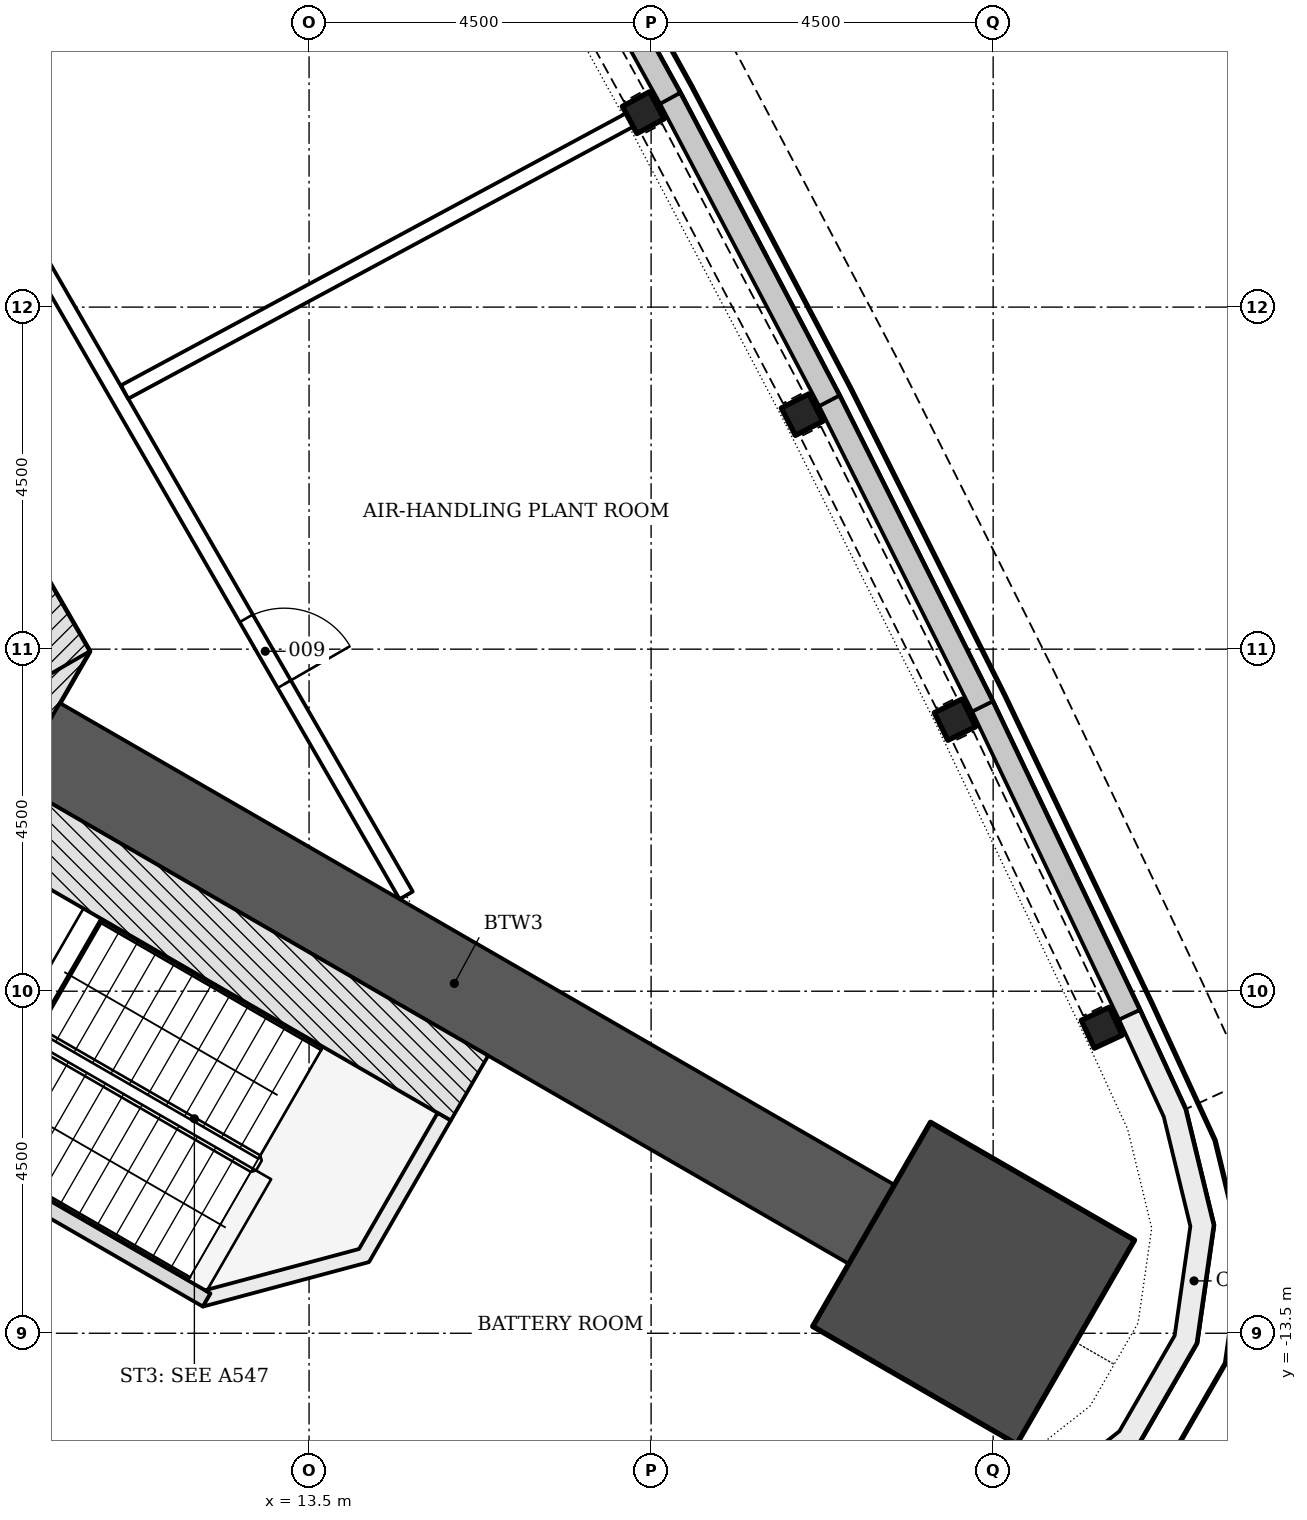
"""IFC4 building model, lengths in metres.
Left out: names, types, materials, properties, quantities, classifications, styles, units other than length and angle.
Written with IfcOpenShell. Run it as: python <this file> out.ifc"""

import sys

from ifc_helpers import new_model, si_unit, direction, frame, frame_2d, origin, origin_2d, place, context, subcontext, project, spatial, polyline, rectangle, i_section, outline, extrude, element, fill, save


model = new_model("IFC4")
c1 = context("Model", 3, precision=1e-05, world=origin(), true_north=direction((0.0, 1.0)))
c2 = subcontext(c1, "Body", "Model", "MODEL_VIEW")
j1 = project(units=[si_unit("LENGTHUNIT", "METRE"), si_unit("PLANEANGLEUNIT", "RADIAN")], contexts=[c1])
p1 = place(None, origin())
s1 = spatial("IfcSite", under=j1, at=p1, CompositionType="ELEMENT")
p2 = place(p1, origin())
s2 = spatial("IfcBuilding", under=s1, at=p2, CompositionType="ELEMENT")
p3 = place(p2, frame((0.0, 0.0, 87.0)))
s3 = spatial("IfcBuildingStorey", under=s2, at=p3, CompositionType="ELEMENT", Elevation=87.0)
p4 = place(p3, frame((8.926, -6.753, -0.3), z_axis=(0.0, 0.0, 1.0), x_axis=(0.500042739161, 0.866000726912, 0.0)))
e1 = element("IfcWall", 1, at=p4, inside=s3, PredefinedType="SHEAR", context=c2, shape_type="SweptSolid", body=[
    extrude(rectangle(XDim=2.771, YDim=0.7, at=frame_2d((1.386, 0.0))), origin(), (0.0, 0.0, 1.0), 4.6),
])
p5 = place(p3, frame((10.311, -4.703, -0.3), z_axis=(0.0, 0.0, 1.0), x_axis=(-0.500001446645, 0.866024568562, 0.0)))
e2 = element("IfcWall", 2, at=p5, inside=s3, PredefinedType="SHEAR", context=c2, shape_type="SweptSolid", body=[
    extrude(rectangle(XDim=18.458, YDim=0.7, at=frame_2d((9.229, 0.0))), origin(), (0.0, 0.0, 1.0), 4.6),
])
p6 = place(p5, frame((8.7, 0.0, 0.3)))
e3 = element("IfcOpeningElement", 3, at=p6, cuts=e2, PredefinedType="OPENING", context=c2, shape_type="SweptSolid", body=[
    extrude(rectangle(XDim=1.0, YDim=2.1, at=frame_2d((0.5, 1.05))), frame((0.0, 0.36, 0.0), z_axis=(0.0, -1.0, 0.0), x_axis=(1.0, 0.0, 0.0)), (0.0, 0.0, 1.0), 0.72),
])
p7 = place(p5, frame((4.002, 0.0, 0.3)))
e4 = element("IfcOpeningElement", 4, at=p7, cuts=e2, PredefinedType="OPENING", context=c2, shape_type="SweptSolid", body=[
    extrude(rectangle(XDim=0.9, YDim=2.1, at=frame_2d((0.45, 1.05))), frame((0.0, 0.36, 0.0), z_axis=(0.0, -1.0, 0.0), x_axis=(1.0, 0.0, 0.0)), (0.0, 0.0, 1.0), 0.72),
])
p8 = place(p5, frame((14.093, 0.0, 0.3)))
e5 = element("IfcOpeningElement", 5, at=p8, cuts=e2, PredefinedType="OPENING", context=c2, shape_type="SweptSolid", body=[
    extrude(rectangle(XDim=0.9, YDim=2.1, at=frame_2d((0.45, 1.05))), frame((0.0, 0.36, 0.0), z_axis=(0.0, -1.0, 0.0), x_axis=(1.0, 0.0, 0.0)), (0.0, 0.0, 1.0), 0.72),
])
p9 = place(p3, frame((9.922, -5.728, -0.3), z_axis=(0.0, 0.0, 1.0), x_axis=(0.866029086277, -0.499993621681, 0.0)))
e6 = element("IfcWall", 6, at=p9, inside=s3, PredefinedType="SHEAR", context=c2, shape_type="SweptSolid", body=[
    extrude(rectangle(XDim=12.677, YDim=1.2, at=frame_2d((6.339, 0.0))), origin(), (0.0, 0.0, 1.0), 4.6),
])
p10 = place(p3, frame((22.243, -12.842, -0.3), z_axis=(0.0, 0.0, 1.0), x_axis=(0.866025403784, -0.5, 0.0)))
e7 = element("IfcColumn", 7, at=p10, inside=s3, PredefinedType="COLUMN", context=c2, shape_type="SweptSolid", body=[
    extrude(rectangle(XDim=3.1, YDim=3.1, at=origin_2d()), origin(), (0.0, 0.0, 1.0), 4.6),
])
for number, where, z_axis, x_axis in (
    (8, (23.929, -9.48, -0.3), (0.0, 0.0, 1.0), (-0.421, 0.907, 0.0)),
    (9, (21.998, -5.428, -0.3), (0.0, 0.0, 1.0), (-0.439, 0.898, 0.0)),
    (10, (19.986, -1.415, -0.3), (0.0, 0.0, 1.0), (-0.457, 0.89, 0.0)),
    (11, (17.897, 2.558, -0.3), (0.0, 0.0, 1.0), (-0.474, 0.88, 0.0)),
):
    element("IfcColumn", number, at=place(p3, frame(where, z_axis=z_axis, x_axis=x_axis)), inside=s3, PredefinedType="COLUMN", context=c2, shape_type="SweptSolid", body=[
        extrude(i_section(OverallWidth=0.404, OverallDepth=0.406, WebThickness=0.027, FlangeThickness=0.044, FilletRadius=0.015, at=origin_2d()), origin(), (0.0, 0.0, 1.0), 4.6),
    ])
p11 = place(p3, origin())
e12 = element("IfcWall", 12, at=p11, inside=s3, PredefinedType="NOTDEFINED", context=c2, shape_type="SweptSolid", body=[
    extrude(outline(polyline([(24.428, -9.249), (22.492, -5.187), (22.221, -5.316), (24.157, -9.378), (24.428, -9.249)])), origin(), (0.0, 0.0, 1.0), 1.2),
])
p12 = place(p3, origin())
e13 = element("IfcWall", 13, at=p12, inside=s3, PredefinedType="NOTDEFINED", context=c2, shape_type="SweptSolid", body=[
    extrude(outline(polyline([(22.492, -5.187), (20.476, -1.164), (20.208, -1.298), (22.224, -5.321), (22.492, -5.187)])), origin(), (0.0, 0.0, 1.0), 1.2),
])
p13 = place(p3, origin())
e14 = element("IfcWall", 14, at=p13, inside=s3, PredefinedType="NOTDEFINED", context=c2, shape_type="SweptSolid", body=[
    extrude(outline(polyline([(20.476, -1.164), (18.381, 2.819), (18.115, 2.679), (20.21, -1.303), (20.476, -1.164)])), origin(), (0.0, 0.0, 1.0), 1.2),
])
p14 = place(p3, origin())
e15 = element("IfcWall", 15, at=p14, inside=s3, PredefinedType="NOTDEFINED", context=c2, shape_type="SweptSolid", body=[
    extrude(outline(polyline([(18.381, 2.819), (16.208, 6.76), (15.945, 6.615), (18.118, 2.674), (18.381, 2.819)])), origin(), (0.0, 0.0, 1.0), 1.2),
])
p15 = place(p3, origin())
e16 = element("IfcWall", 16, at=p15, inside=s3, PredefinedType="NOTDEFINED", context=c2, shape_type="SweptSolid", body=[
    extrude(outline(polyline([(20.224, -16.531), (21.654, -16.4), (23.159, -15.958), (24.392, -14.989), (25.177, -13.63), (25.4, -12.077), (25.03, -10.553), (24.428, -9.249), (24.156, -9.374), (24.745, -10.652), (25.094, -12.092), (24.888, -13.53), (24.161, -14.789), (23.019, -15.687), (21.597, -16.104), (20.196, -16.232), (20.224, -16.531)])), origin(), (0.0, 0.0, 1.0), 4.3),
])
p16 = place(p3, frame((7.304, -10.262, -0.3), z_axis=(0.0, 0.0, 1.0), x_axis=(0.866026594901, -0.49999793692, 0.0)))
e17 = element("IfcWall", 17, at=p16, inside=s3, PredefinedType="SHEAR", context=c2, shape_type="SweptSolid", body=[
    extrude(rectangle(XDim=5.6, YDim=0.2, at=frame_2d((2.8, 0.0))), origin(), (0.0, 0.0, 1.0), 4.6),
])
p17 = place(p16, frame((0.45, 0.0, 0.3)))
e18 = element("IfcOpeningElement", 18, at=p17, cuts=e17, PredefinedType="OPENING", context=c2, shape_type="SweptSolid", body=[
    extrude(rectangle(XDim=1.2, YDim=2.1, at=frame_2d((0.6, 1.05))), frame((0.0, 0.11, 0.0), z_axis=(0.0, -1.0, 0.0), x_axis=(1.0, 0.0, 0.0)), (0.0, 0.0, 1.0), 0.22),
])
p18 = place(p3, frame((9.375, -6.675, -0.3), z_axis=(0.0, 0.0, 1.0), x_axis=(0.866026919366, -0.499997374926, 0.0)))
e19 = element("IfcWall", 19, at=p18, inside=s3, PredefinedType="SHEAR", context=c2, shape_type="SweptSolid", body=[
    extrude(rectangle(XDim=7.2, YDim=0.986, at=frame_2d((3.6, 0.0))), origin(), (0.0, 0.0, 1.0), 4.6),
])
p19 = place(p3, frame((0.0, 0.0, -0.3)))
e20 = element("IfcWall", 20, at=p19, inside=s3, PredefinedType="SHEAR", context=c2, shape_type="SweptSolid", body=[
    extrude(outline(polyline([(12.104, -13.149), (14.289, -12.563), (15.364, -10.701), (15.191, -10.601), (14.157, -12.392), (12.132, -12.934), (12.204, -12.976), (12.204, -12.976), (12.204, -12.976), (12.204, -12.976), (12.204, -12.976), (12.204, -12.976), (12.204, -12.976), (12.204, -12.976), (12.204, -12.976), (12.204, -12.976), (12.204, -12.976), (12.204, -12.976), (12.204, -12.976), (12.204, -12.976), (12.204, -12.976), (12.204, -12.976), (12.204, -12.976), (12.104, -13.149)])), origin(), (0.0, 0.0, 1.0), 4.6),
])
p20 = place(p3, frame((5.282, 8.708, 0.0), z_axis=(0.0, 0.0, 1.0), x_axis=(0.500007704848, -0.866020955343, 0.0)))
e21 = element("IfcWall", 21, at=p20, inside=s3, PredefinedType="PARTITIONING", context=c2, shape_type="SweptSolid", body=[
    extrude(rectangle(XDim=18.991, YDim=0.2, at=frame_2d((9.496, 0.0))), origin(), (0.0, 0.0, 1.0), 3.678),
])
p21 = place(p20, frame((14.783, 0.0, 0.0)))
e22 = element("IfcOpeningElement", 22, at=p21, cuts=e21, PredefinedType="OPENING", context=c2, shape_type="SweptSolid", body=[
    extrude(rectangle(XDim=1.0, YDim=2.1, at=frame_2d((0.5, 1.05))), frame((0.0, 0.11, 0.0), z_axis=(0.0, -1.0, 0.0), x_axis=(1.0, 0.0, 0.0)), (0.0, 0.0, 1.0), 0.22),
])
p22 = place(p20, frame((6.567, 0.0, 0.0)))
e23 = element("IfcOpeningElement", 23, at=p22, cuts=e21, PredefinedType="OPENING", context=c2, shape_type="SweptSolid", body=[
    extrude(rectangle(XDim=1.0, YDim=2.1, at=frame_2d((0.5, 1.05))), frame((0.0, 0.11, 0.0), z_axis=(0.0, -1.0, 0.0), x_axis=(1.0, 0.0, 0.0)), (0.0, 0.0, 1.0), 0.22),
])
p23 = place(p20, frame((0.979, 0.0, 0.0)))
e24 = element("IfcOpeningElement", 24, at=p23, cuts=e21, PredefinedType="OPENING", context=c2, shape_type="SweptSolid", body=[
    extrude(rectangle(XDim=1.0, YDim=2.1, at=frame_2d((0.5, 1.05))), frame((0.0, 0.11, 0.0), z_axis=(0.0, -1.0, 0.0), x_axis=(1.0, 0.0, 0.0)), (0.0, 0.0, 1.0), 0.22),
])
p24 = place(p3, frame((11.073, -1.117, 0.0), z_axis=(0.0, 0.0, 1.0), x_axis=(0.880412298069, 0.474209010256, 0.0)))
e25 = element("IfcWall", 25, at=p24, inside=s3, PredefinedType="PARTITIONING", context=c2, shape_type="SweptSolid", body=[
    extrude(rectangle(XDim=7.6, YDim=0.2, at=frame_2d((3.8, 0.0))), origin(), (0.0, 0.0, 1.0), 3.678),
])
p25 = place(p21, origin())
e26 = element("IfcDoor", 26, at=p25, inside=s3, OperationType="SINGLE_SWING_RIGHT", PredefinedType="DOOR", context=c2, shape_type="SweptSolid", body=[
    extrude(rectangle(XDim=1.0, YDim=2.1, at=frame_2d((0.5, 1.05))), frame((0.0, 0.025, 0.0), z_axis=(0.0, -1.0, 0.0), x_axis=(1.0, 0.0, 0.0)), (0.0, 0.0, 1.0), 0.05),
])
fill(e22, e26)
save(model, sys.argv[1])
